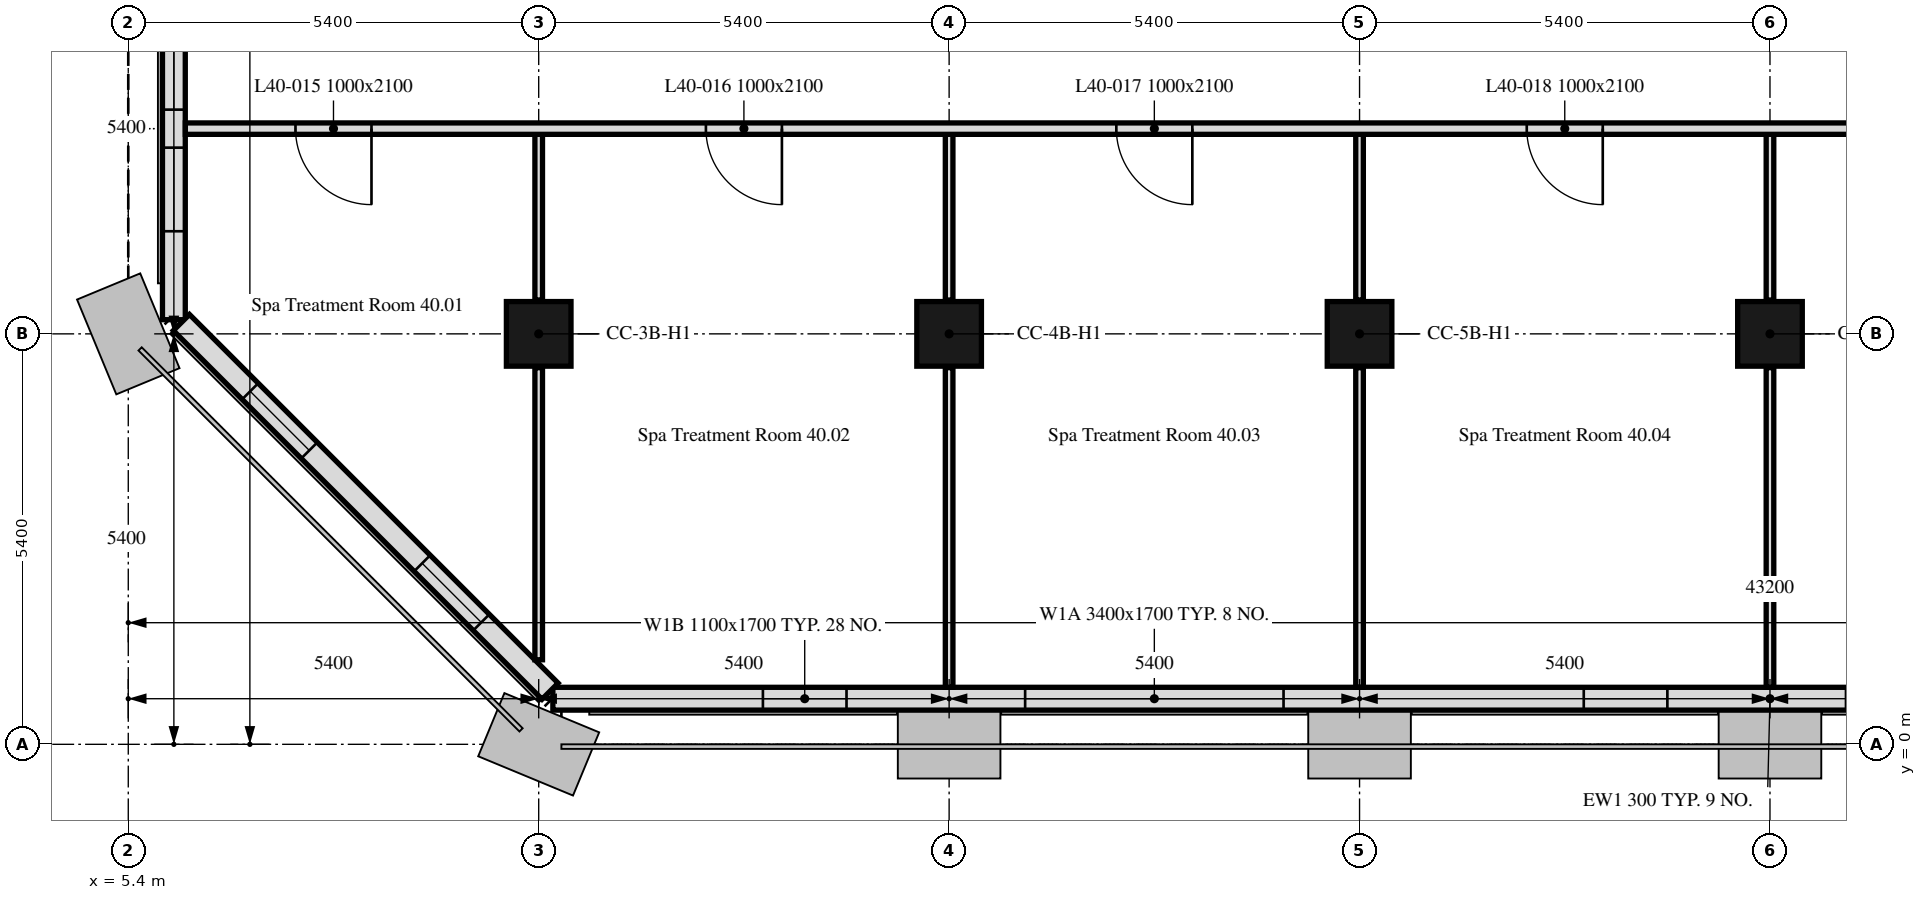
"""IFC4 building model, lengths in metres.
Left out: names, types, materials, properties, quantities, classifications, styles, units other than length and angle.
Written with IfcOpenShell. Run it as: python <this file> out.ifc"""

import sys

from ifc_helpers import new_model, si_unit, direction, frame, frame_2d, origin, origin_2d, place, context, subcontext, project, spatial, rectangle, extrude, element, fill, save


model = new_model("IFC4")
c1 = context("Model", 3, precision=1e-05, world=origin(), true_north=direction((0.0, 1.0)))
c2 = subcontext(c1, "Body", "Model", "MODEL_VIEW")
j1 = project(units=[si_unit("LENGTHUNIT", "METRE"), si_unit("PLANEANGLEUNIT", "RADIAN")], contexts=[c1])
p1 = place(None, origin())
s1 = spatial("IfcSite", under=j1, at=p1, CompositionType="ELEMENT")
p2 = place(p1, origin())
s2 = spatial("IfcBuilding", under=s1, at=p2, CompositionType="ELEMENT")
p3 = place(p2, frame((0.0, 0.0, 169.3)))
s3 = spatial("IfcBuildingStorey", under=s2, at=p3, CompositionType="ELEMENT", Elevation=169.3)
for number, where, z_axis, x_axis in (
    (1, (10.8, 5.4, 0.0), (0.0, 0.0, 1.0), (1.0, 0.0, 0.0)),
    (2, (16.2, 5.4, 0.0), (0.0, 0.0, 1.0), (1.0, 0.0, 0.0)),
    (3, (21.6, 5.4, 0.0), (0.0, 0.0, 1.0), (1.0, 0.0, 0.0)),
    (4, (27.0, 5.4, 0.0), (0.0, 0.0, 1.0), (1.0, 0.0, 0.0)),
):
    element("IfcColumn", number, at=place(p3, frame(where, z_axis=z_axis, x_axis=x_axis)), inside=s3, PredefinedType="COLUMN", context=c2, shape_type="SweptSolid", body=[
        extrude(rectangle(XDim=0.85, YDim=0.85, at=origin_2d()), origin(), (0.0, 0.0, 1.0), 3.0),
    ])
p4 = place(p3, frame((10.986, 0.6, 0.0), z_axis=(0.0, 0.0, 1.0), x_axis=(1.0, 0.0, 0.0)))
e5 = element("IfcWall", 5, at=p4, inside=s3, PredefinedType="SOLIDWALL", context=c2, shape_type="SweptSolid", body=[
    extrude(rectangle(XDim=32.027, YDim=0.3, at=frame_2d((16.014, 0.0))), origin(), (0.0, 0.0, 1.0), 3.0),
])
p5 = place(p4, frame((2.764, 0.0, 0.9)))
e6 = element("IfcOpeningElement", 6, at=p5, cuts=e5, PredefinedType="OPENING", context=c2, shape_type="SweptSolid", body=[
    extrude(rectangle(XDim=1.1, YDim=1.7, at=frame_2d((0.55, 0.85))), frame((0.0, 0.16, 0.0), z_axis=(0.0, -1.0, 0.0), x_axis=(1.0, 0.0, 0.0)), (0.0, 0.0, 1.0), 0.32),
])
p6 = place(p4, frame((6.214, 0.0, 0.9)))
e7 = element("IfcOpeningElement", 7, at=p6, cuts=e5, PredefinedType="OPENING", context=c2, shape_type="SweptSolid", body=[
    extrude(rectangle(XDim=3.4, YDim=1.7, at=frame_2d((1.7, 0.85))), frame((0.0, 0.16, 0.0), z_axis=(0.0, -1.0, 0.0), x_axis=(1.0, 0.0, 0.0)), (0.0, 0.0, 1.0), 0.32),
])
p7 = place(p4, frame((13.564, 0.0, 0.9)))
e8 = element("IfcOpeningElement", 8, at=p7, cuts=e5, PredefinedType="OPENING", context=c2, shape_type="SweptSolid", body=[
    extrude(rectangle(XDim=1.1, YDim=1.7, at=frame_2d((0.55, 0.85))), frame((0.0, 0.16, 0.0), z_axis=(0.0, -1.0, 0.0), x_axis=(1.0, 0.0, 0.0)), (0.0, 0.0, 1.0), 0.32),
])
p8 = place(p4, frame((17.014, 0.0, 0.9)))
e9 = element("IfcOpeningElement", 9, at=p8, cuts=e5, PredefinedType="OPENING", context=c2, shape_type="SweptSolid", body=[
    extrude(rectangle(XDim=3.4, YDim=1.7, at=frame_2d((1.7, 0.85))), frame((0.0, 0.16, 0.0), z_axis=(0.0, -1.0, 0.0), x_axis=(1.0, 0.0, 0.0)), (0.0, 0.0, 1.0), 0.32),
])
p9 = place(p4, frame((24.364, 0.0, 0.9)))
e10 = element("IfcOpeningElement", 10, at=p9, cuts=e5, PredefinedType="OPENING", context=c2, shape_type="SweptSolid", body=[
    extrude(rectangle(XDim=1.1, YDim=1.7, at=frame_2d((0.55, 0.85))), frame((0.0, 0.16, 0.0), z_axis=(0.0, -1.0, 0.0), x_axis=(1.0, 0.0, 0.0)), (0.0, 0.0, 1.0), 0.32),
])
p10 = place(p4, frame((27.814, 0.0, 0.9)))
e11 = element("IfcOpeningElement", 11, at=p10, cuts=e5, PredefinedType="OPENING", context=c2, shape_type="SweptSolid", body=[
    extrude(rectangle(XDim=3.4, YDim=1.7, at=frame_2d((1.7, 0.85))), frame((0.0, 0.16, 0.0), z_axis=(0.0, -1.0, 0.0), x_axis=(1.0, 0.0, 0.0)), (0.0, 0.0, 1.0), 0.32),
])
p11 = place(p3, frame((6.0, 16.2, 0.0), z_axis=(0.0, 0.0, 1.0), x_axis=(0.0, -1.0, 0.0)))
e12 = element("IfcWall", 12, at=p11, inside=s3, PredefinedType="SOLIDWALL", context=c2, shape_type="SweptSolid", body=[
    extrude(rectangle(XDim=10.614, YDim=0.3, at=frame_2d((5.307, 0.0))), origin(), (0.0, 0.0, 1.0), 3.0),
])
p12 = place(p11, frame((1.35, 0.0, 0.9)))
e13 = element("IfcOpeningElement", 13, at=p12, cuts=e12, PredefinedType="OPENING", context=c2, shape_type="SweptSolid", body=[
    extrude(rectangle(XDim=1.1, YDim=1.7, at=frame_2d((0.55, 0.85))), frame((0.0, 0.16, 0.0), z_axis=(0.0, -1.0, 0.0), x_axis=(1.0, 0.0, 0.0)), (0.0, 0.0, 1.0), 0.32),
])
p13 = place(p11, frame((2.95, 0.0, 0.9)))
e14 = element("IfcOpeningElement", 14, at=p13, cuts=e12, PredefinedType="OPENING", context=c2, shape_type="SweptSolid", body=[
    extrude(rectangle(XDim=1.1, YDim=1.7, at=frame_2d((0.55, 0.85))), frame((0.0, 0.16, 0.0), z_axis=(0.0, -1.0, 0.0), x_axis=(1.0, 0.0, 0.0)), (0.0, 0.0, 1.0), 0.32),
])
p14 = place(p11, frame((6.75, 0.0, 0.9)))
e15 = element("IfcOpeningElement", 15, at=p14, cuts=e12, PredefinedType="OPENING", context=c2, shape_type="SweptSolid", body=[
    extrude(rectangle(XDim=1.1, YDim=1.7, at=frame_2d((0.55, 0.85))), frame((0.0, 0.16, 0.0), z_axis=(0.0, -1.0, 0.0), x_axis=(1.0, 0.0, 0.0)), (0.0, 0.0, 1.0), 0.32),
])
p15 = place(p11, frame((8.35, 0.0, 0.9)))
e16 = element("IfcOpeningElement", 16, at=p15, cuts=e12, PredefinedType="OPENING", context=c2, shape_type="SweptSolid", body=[
    extrude(rectangle(XDim=1.1, YDim=1.7, at=frame_2d((0.55, 0.85))), frame((0.0, 0.16, 0.0), z_axis=(0.0, -1.0, 0.0), x_axis=(1.0, 0.0, 0.0)), (0.0, 0.0, 1.0), 0.32),
])
p16 = place(p3, frame((6.099, 5.55, 0.0), z_axis=(0.0, 0.0, 1.0), x_axis=(0.707106781187, -0.707106781187, 0.0)))
e17 = element("IfcWall", 17, at=p16, inside=s3, PredefinedType="SOLIDWALL", context=c2, shape_type="SweptSolid", body=[
    extrude(rectangle(XDim=6.86, YDim=0.3, at=frame_2d((3.43, 0.0))), origin(), (0.0, 0.0, 1.0), 3.0),
])
p17 = place(p16, frame((1.28, 0.0, 0.9)))
e18 = element("IfcOpeningElement", 18, at=p17, cuts=e17, PredefinedType="OPENING", context=c2, shape_type="SweptSolid", body=[
    extrude(rectangle(XDim=1.1, YDim=1.7, at=frame_2d((0.55, 0.85))), frame((0.0, 0.16, 0.0), z_axis=(0.0, -1.0, 0.0), x_axis=(1.0, 0.0, 0.0)), (0.0, 0.0, 1.0), 0.32),
])
p18 = place(p16, frame((4.48, 0.0, 0.9)))
e19 = element("IfcOpeningElement", 19, at=p18, cuts=e17, PredefinedType="OPENING", context=c2, shape_type="SweptSolid", body=[
    extrude(rectangle(XDim=1.1, YDim=1.7, at=frame_2d((0.55, 0.85))), frame((0.0, 0.16, 0.0), z_axis=(0.0, -1.0, 0.0), x_axis=(1.0, 0.0, 0.0)), (0.0, 0.0, 1.0), 0.32),
])
p19 = place(p3, frame((10.8, 1.112, 0.0), z_axis=(0.0, 0.0, 1.0), x_axis=(0.0, 1.0, 0.0)))
e20 = element("IfcWall", 20, at=p19, inside=s3, PredefinedType="PARTITIONING", context=c2, shape_type="SweptSolid", body=[
    extrude(rectangle(XDim=3.843, YDim=0.1, at=frame_2d((1.921, 0.0))), origin(), (0.0, 0.0, 1.0), 3.0),
])
p20 = place(p3, frame((10.8, 5.845, 0.0), z_axis=(0.0, 0.0, 1.0), x_axis=(0.0, 1.0, 0.0)))
e21 = element("IfcWall", 21, at=p20, inside=s3, PredefinedType="PARTITIONING", context=c2, shape_type="SweptSolid", body=[
    extrude(rectangle(XDim=2.18, YDim=0.1, at=frame_2d((1.09, 0.0))), origin(), (0.0, 0.0, 1.0), 3.0),
])
p21 = place(p3, frame((16.2, 0.751, 0.0), z_axis=(0.0, 0.0, 1.0), x_axis=(0.0, 1.0, 0.0)))
e22 = element("IfcWall", 22, at=p21, inside=s3, PredefinedType="PARTITIONING", context=c2, shape_type="SweptSolid", body=[
    extrude(rectangle(XDim=4.204, YDim=0.1, at=frame_2d((2.102, 0.0))), origin(), (0.0, 0.0, 1.0), 2.4),
])
p22 = place(p3, frame((16.2, 5.845, 0.0), z_axis=(0.0, 0.0, 1.0), x_axis=(0.0, 1.0, 0.0)))
e23 = element("IfcWall", 23, at=p22, inside=s3, PredefinedType="PARTITIONING", context=c2, shape_type="SweptSolid", body=[
    extrude(rectangle(XDim=2.18, YDim=0.1, at=frame_2d((1.09, 0.0))), origin(), (0.0, 0.0, 1.0), 2.4),
])
p23 = place(p3, frame((21.6, 0.751, 0.0), z_axis=(0.0, 0.0, 1.0), x_axis=(0.0, 1.0, 0.0)))
e24 = element("IfcWall", 24, at=p23, inside=s3, PredefinedType="PARTITIONING", context=c2, shape_type="SweptSolid", body=[
    extrude(rectangle(XDim=4.204, YDim=0.1, at=frame_2d((2.102, 0.0))), origin(), (0.0, 0.0, 1.0), 2.4),
])
p24 = place(p3, frame((21.6, 5.845, 0.0), z_axis=(0.0, 0.0, 1.0), x_axis=(0.0, 1.0, 0.0)))
e25 = element("IfcWall", 25, at=p24, inside=s3, PredefinedType="PARTITIONING", context=c2, shape_type="SweptSolid", body=[
    extrude(rectangle(XDim=2.18, YDim=0.1, at=frame_2d((1.09, 0.0))), origin(), (0.0, 0.0, 1.0), 2.4),
])
p25 = place(p3, frame((27.0, 0.751, 0.0), z_axis=(0.0, 0.0, 1.0), x_axis=(0.0, 1.0, 0.0)))
e26 = element("IfcWall", 26, at=p25, inside=s3, PredefinedType="PARTITIONING", context=c2, shape_type="SweptSolid", body=[
    extrude(rectangle(XDim=4.204, YDim=0.1, at=frame_2d((2.102, 0.0))), origin(), (0.0, 0.0, 1.0), 2.4),
])
p26 = place(p3, frame((27.0, 5.845, 0.0), z_axis=(0.0, 0.0, 1.0), x_axis=(0.0, 1.0, 0.0)))
e27 = element("IfcWall", 27, at=p26, inside=s3, PredefinedType="PARTITIONING", context=c2, shape_type="SweptSolid", body=[
    extrude(rectangle(XDim=2.18, YDim=0.1, at=frame_2d((1.09, 0.0))), origin(), (0.0, 0.0, 1.0), 2.4),
])
p27 = place(p3, frame((45.375, 8.1, 0.0), z_axis=(0.0, 0.0, 1.0), x_axis=(-1.0, 0.0, 0.0)))
e28 = element("IfcWall", 28, at=p27, inside=s3, PredefinedType="PARTITIONING", context=c2, shape_type="SweptSolid", body=[
    extrude(rectangle(XDim=39.224, YDim=0.15, at=frame_2d((19.612, 0.0))), origin(), (0.0, 0.0, 1.0), 2.4),
])
p28 = place(p27, frame((36.775, 0.0, 0.0)))
e29 = element("IfcOpeningElement", 29, at=p28, cuts=e28, PredefinedType="OPENING", context=c2, shape_type="SweptSolid", body=[
    extrude(rectangle(XDim=1.0, YDim=2.1, at=frame_2d((0.5, 1.05))), frame((0.0, 0.075, 0.0), z_axis=(0.0, -1.0, 0.0), x_axis=(1.0, 0.0, 0.0)), (0.0, 0.0, 1.0), 0.15),
])
p29 = place(p27, frame((31.375, 0.0, 0.0)))
e30 = element("IfcOpeningElement", 30, at=p29, cuts=e28, PredefinedType="OPENING", context=c2, shape_type="SweptSolid", body=[
    extrude(rectangle(XDim=1.0, YDim=2.1, at=frame_2d((0.5, 1.05))), frame((0.0, 0.075, 0.0), z_axis=(0.0, -1.0, 0.0), x_axis=(1.0, 0.0, 0.0)), (0.0, 0.0, 1.0), 0.15),
])
p30 = place(p27, frame((25.975, 0.0, 0.0)))
e31 = element("IfcOpeningElement", 31, at=p30, cuts=e28, PredefinedType="OPENING", context=c2, shape_type="SweptSolid", body=[
    extrude(rectangle(XDim=1.0, YDim=2.1, at=frame_2d((0.5, 1.05))), frame((0.0, 0.075, 0.0), z_axis=(0.0, -1.0, 0.0), x_axis=(1.0, 0.0, 0.0)), (0.0, 0.0, 1.0), 0.15),
])
p31 = place(p27, frame((20.575, 0.0, 0.0)))
e32 = element("IfcOpeningElement", 32, at=p31, cuts=e28, PredefinedType="OPENING", context=c2, shape_type="SweptSolid", body=[
    extrude(rectangle(XDim=1.0, YDim=2.1, at=frame_2d((0.5, 1.05))), frame((0.0, 0.075, 0.0), z_axis=(0.0, -1.0, 0.0), x_axis=(1.0, 0.0, 0.0)), (0.0, 0.0, 1.0), 0.15),
])
p32 = place(p27, frame((15.175, 0.0, 0.0)))
e33 = element("IfcOpeningElement", 33, at=p32, cuts=e28, PredefinedType="OPENING", context=c2, shape_type="SweptSolid", body=[
    extrude(rectangle(XDim=1.0, YDim=2.1, at=frame_2d((0.5, 1.05))), frame((0.0, 0.075, 0.0), z_axis=(0.0, -1.0, 0.0), x_axis=(1.0, 0.0, 0.0)), (0.0, 0.0, 1.0), 0.15),
])
p33 = place(p27, frame((9.775, 0.0, 0.0)))
e34 = element("IfcOpeningElement", 34, at=p33, cuts=e28, PredefinedType="OPENING", context=c2, shape_type="SweptSolid", body=[
    extrude(rectangle(XDim=1.0, YDim=2.1, at=frame_2d((0.5, 1.05))), frame((0.0, 0.075, 0.0), z_axis=(0.0, -1.0, 0.0), x_axis=(1.0, 0.0, 0.0)), (0.0, 0.0, 1.0), 0.15),
])
p34 = place(p27, frame((3.325, 0.0, 0.0)))
e35 = element("IfcOpeningElement", 35, at=p34, cuts=e28, PredefinedType="OPENING", context=c2, shape_type="SweptSolid", body=[
    extrude(rectangle(XDim=1.0, YDim=2.1, at=frame_2d((0.5, 1.05))), frame((0.0, 0.075, 0.0), z_axis=(0.0, -1.0, 0.0), x_axis=(1.0, 0.0, 0.0)), (0.0, 0.0, 1.0), 0.15),
])
p35 = place(p5, origin())
e36 = element("IfcWindow", 36, at=p35, inside=s3, PartitioningType="SINGLE_PANEL", PredefinedType="WINDOW", context=c2, shape_type="SweptSolid", body=[
    extrude(rectangle(XDim=1.1, YDim=1.7, at=frame_2d((0.55, 0.85))), frame((0.0, 0.03, 0.0), z_axis=(0.0, -1.0, 0.0), x_axis=(1.0, 0.0, 0.0)), (0.0, 0.0, 1.0), 0.06),
])
fill(e6, e36)
p36 = place(p6, origin())
e37 = element("IfcWindow", 37, at=p36, inside=s3, PartitioningType="SINGLE_PANEL", PredefinedType="WINDOW", context=c2, shape_type="SweptSolid", body=[
    extrude(rectangle(XDim=3.4, YDim=1.7, at=frame_2d((1.7, 0.85))), frame((0.0, 0.03, 0.0), z_axis=(0.0, -1.0, 0.0), x_axis=(1.0, 0.0, 0.0)), (0.0, 0.0, 1.0), 0.06),
])
fill(e7, e37)
p37 = place(p7, origin())
e38 = element("IfcWindow", 38, at=p37, inside=s3, PartitioningType="SINGLE_PANEL", PredefinedType="WINDOW", context=c2, shape_type="SweptSolid", body=[
    extrude(rectangle(XDim=1.1, YDim=1.7, at=frame_2d((0.55, 0.85))), frame((0.0, 0.03, 0.0), z_axis=(0.0, -1.0, 0.0), x_axis=(1.0, 0.0, 0.0)), (0.0, 0.0, 1.0), 0.06),
])
fill(e8, e38)
p38 = place(p14, origin())
e39 = element("IfcWindow", 39, at=p38, inside=s3, PartitioningType="SINGLE_PANEL", PredefinedType="WINDOW", context=c2, shape_type="SweptSolid", body=[
    extrude(rectangle(XDim=1.1, YDim=1.7, at=frame_2d((0.55, 0.85))), frame((0.0, 0.03, 0.0), z_axis=(0.0, -1.0, 0.0), x_axis=(1.0, 0.0, 0.0)), (0.0, 0.0, 1.0), 0.06),
])
fill(e15, e39)
p39 = place(p15, origin())
e40 = element("IfcWindow", 40, at=p39, inside=s3, PartitioningType="SINGLE_PANEL", PredefinedType="WINDOW", context=c2, shape_type="SweptSolid", body=[
    extrude(rectangle(XDim=1.1, YDim=1.7, at=frame_2d((0.55, 0.85))), frame((0.0, 0.03, 0.0), z_axis=(0.0, -1.0, 0.0), x_axis=(1.0, 0.0, 0.0)), (0.0, 0.0, 1.0), 0.06),
])
fill(e16, e40)
p40 = place(p17, origin())
e41 = element("IfcWindow", 41, at=p40, inside=s3, PartitioningType="SINGLE_PANEL", PredefinedType="WINDOW", context=c2, shape_type="SweptSolid", body=[
    extrude(rectangle(XDim=1.1, YDim=1.7, at=frame_2d((0.55, 0.85))), frame((0.0, 0.03, 0.0), z_axis=(0.0, -1.0, 0.0), x_axis=(1.0, 0.0, 0.0)), (0.0, 0.0, 1.0), 0.06),
])
fill(e18, e41)
p41 = place(p18, origin())
e42 = element("IfcWindow", 42, at=p41, inside=s3, PartitioningType="SINGLE_PANEL", PredefinedType="WINDOW", context=c2, shape_type="SweptSolid", body=[
    extrude(rectangle(XDim=1.1, YDim=1.7, at=frame_2d((0.55, 0.85))), frame((0.0, 0.03, 0.0), z_axis=(0.0, -1.0, 0.0), x_axis=(1.0, 0.0, 0.0)), (0.0, 0.0, 1.0), 0.06),
])
fill(e19, e42)
p42 = place(p28, origin())
e43 = element("IfcDoor", 43, at=p42, inside=s3, OperationType="SINGLE_SWING_LEFT", PredefinedType="DOOR", context=c2, shape_type="SweptSolid", body=[
    extrude(rectangle(XDim=1.0, YDim=2.1, at=frame_2d((0.5, 1.05))), frame((0.0, 0.025, 0.0), z_axis=(0.0, -1.0, 0.0), x_axis=(1.0, 0.0, 0.0)), (0.0, 0.0, 1.0), 0.05),
])
fill(e29, e43)
p43 = place(p29, origin())
e44 = element("IfcDoor", 44, at=p43, inside=s3, OperationType="SINGLE_SWING_RIGHT", PredefinedType="DOOR", context=c2, shape_type="SweptSolid", body=[
    extrude(rectangle(XDim=1.0, YDim=2.1, at=frame_2d((0.5, 1.05))), frame((0.0, 0.025, 0.0), z_axis=(0.0, -1.0, 0.0), x_axis=(1.0, 0.0, 0.0)), (0.0, 0.0, 1.0), 0.05),
])
fill(e30, e44)
p44 = place(p30, origin())
e45 = element("IfcDoor", 45, at=p44, inside=s3, OperationType="SINGLE_SWING_RIGHT", PredefinedType="DOOR", context=c2, shape_type="SweptSolid", body=[
    extrude(rectangle(XDim=1.0, YDim=2.1, at=frame_2d((0.5, 1.05))), frame((0.0, 0.025, 0.0), z_axis=(0.0, -1.0, 0.0), x_axis=(1.0, 0.0, 0.0)), (0.0, 0.0, 1.0), 0.05),
])
fill(e31, e45)
p45 = place(p31, origin())
e46 = element("IfcDoor", 46, at=p45, inside=s3, OperationType="SINGLE_SWING_LEFT", PredefinedType="DOOR", context=c2, shape_type="SweptSolid", body=[
    extrude(rectangle(XDim=1.0, YDim=2.1, at=frame_2d((0.5, 1.05))), frame((0.0, 0.025, 0.0), z_axis=(0.0, -1.0, 0.0), x_axis=(1.0, 0.0, 0.0)), (0.0, 0.0, 1.0), 0.05),
])
fill(e32, e46)
save(model, sys.argv[1])
